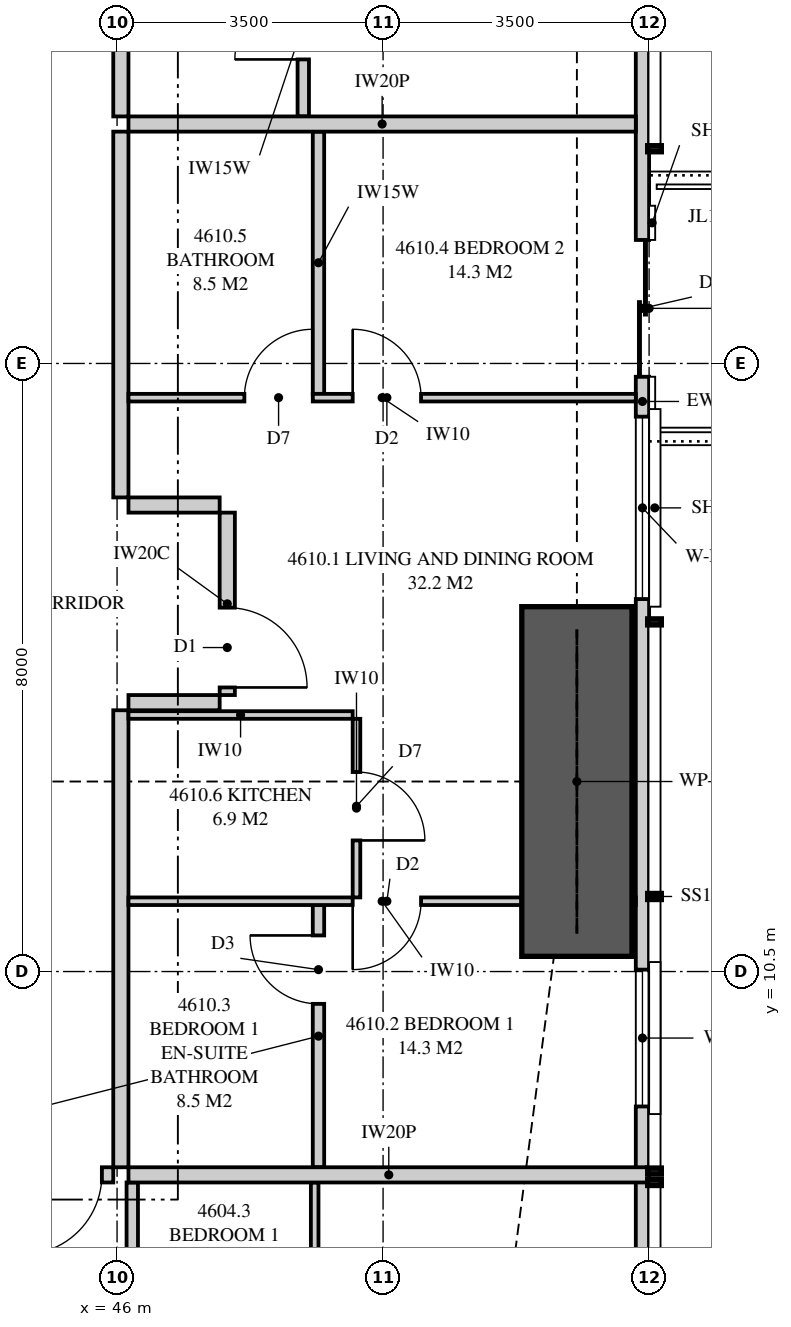
"""IFC4 building model, lengths in metres.
Left out: names, types, materials, properties, quantities, classifications, styles, units other than length and angle.
Written with IfcOpenShell. Run it as: python <this file> out.ifc"""

import sys

from ifc_helpers import new_model, si_unit, direction, frame, frame_2d, origin, place, context, subcontext, project, spatial, polyline, rectangle, outline, extrude, element, fill, save


model = new_model("IFC4")
c1 = context("Model", 3, precision=1e-05, world=origin(), true_north=direction((0.0, 1.0)))
c2 = subcontext(c1, "Body", "Model", "MODEL_VIEW")
j1 = project(units=[si_unit("LENGTHUNIT", "METRE"), si_unit("PLANEANGLEUNIT", "RADIAN")], contexts=[c1])
p1 = place(None, origin())
s1 = spatial("IfcSite", under=j1, at=p1, CompositionType="ELEMENT")
p2 = place(p1, origin())
s2 = spatial("IfcBuilding", under=s1, at=p2, CompositionType="ELEMENT")
p3 = place(p2, frame((0.0, 0.0, 171.1)))
s3 = spatial("IfcBuildingStorey", under=s2, at=p3, CompositionType="ELEMENT", Elevation=171.1)
p4 = place(p3, frame((52.913, 3.051, 0.0), z_axis=(0.0, 0.0, 1.0), x_axis=(0.0, 1.0, 0.0)))
e1 = element("IfcWall", 1, at=p4, inside=s3, PredefinedType="SOLIDWALL", context=c2, shape_type="SweptSolid", body=[
    extrude(outline(polyline([(0.0, 0.0), (29.897, 0.0), (29.897, 3.11), (22.167, 3.11), (22.167, 2.15), (22.074, 2.15), (22.074, 3.11), (21.949, 3.11), (21.949, 2.15), (9.949, 2.15), (9.949, 3.11), (9.847, 3.11), (9.847, 2.15), (9.706, 2.15), (9.706, 3.11), (0.0, 3.11), (0.0, 0.0)])), frame((0.0, 0.087, 0.0), z_axis=(0.0, -1.0, 0.0), x_axis=(1.0, 0.0, 0.0)), (0.0, 0.0, 1.0), 0.175),
])
p5 = place(p4, frame((1.797, 0.0, 0.4)))
e2 = element("IfcOpeningElement", 2, at=p5, cuts=e1, PredefinedType="OPENING", context=c2, shape_type="SweptSolid", body=[
    extrude(rectangle(XDim=1.8, YDim=1.7, at=frame_2d((0.9, 0.85))), frame((0.0, 0.097, 0.0), z_axis=(0.0, -1.0, 0.0), x_axis=(1.0, 0.0, 0.0)), (0.0, 0.0, 1.0), 0.195),
])
p6 = place(p4, frame((5.674, 0.0, 0.4)))
e3 = element("IfcOpeningElement", 3, at=p6, cuts=e1, PredefinedType="OPENING", context=c2, shape_type="SweptSolid", body=[
    extrude(rectangle(XDim=1.8, YDim=1.7, at=frame_2d((0.9, 0.85))), frame((0.0, 0.097, 0.0), z_axis=(0.0, -1.0, 0.0), x_axis=(1.0, 0.0, 0.0)), (0.0, 0.0, 1.0), 0.195),
])
p7 = place(p4, frame((12.349, 0.0, 0.4)))
e4 = element("IfcOpeningElement", 4, at=p7, cuts=e1, PredefinedType="OPENING", context=c2, shape_type="SweptSolid", body=[
    extrude(rectangle(XDim=2.4, YDim=1.7, at=frame_2d((1.2, 0.85))), frame((0.0, 0.097, 0.0), z_axis=(0.0, -1.0, 0.0), x_axis=(1.0, 0.0, 0.0)), (0.0, 0.0, 1.0), 0.195),
])
p8 = place(p4, frame((15.274, 0.0, 0.0)))
e5 = element("IfcOpeningElement", 5, at=p8, cuts=e1, PredefinedType="OPENING", context=c2, shape_type="SweptSolid", body=[
    extrude(rectangle(XDim=1.8, YDim=2.1, at=frame_2d((0.9, 1.05))), frame((0.0, 0.097, 0.0), z_axis=(0.0, -1.0, 0.0), x_axis=(1.0, 0.0, 0.0)), (0.0, 0.0, 1.0), 0.195),
])
p9 = place(p4, frame((24.373, 0.0, 0.4)))
e6 = element("IfcOpeningElement", 6, at=p9, cuts=e1, PredefinedType="OPENING", context=c2, shape_type="SweptSolid", body=[
    extrude(rectangle(XDim=1.2, YDim=1.7, at=frame_2d((0.6, 0.85))), frame((0.0, 0.097, 0.0), z_axis=(0.0, -1.0, 0.0), x_axis=(1.0, 0.0, 0.0)), (0.0, 0.0, 1.0), 0.195),
])
p10 = place(p4, frame((26.801, 0.0, 0.4)))
e7 = element("IfcOpeningElement", 7, at=p10, cuts=e1, PredefinedType="OPENING", context=c2, shape_type="SweptSolid", body=[
    extrude(rectangle(XDim=1.8, YDim=1.7, at=frame_2d((0.9, 0.85))), frame((0.0, 0.097, 0.0), z_axis=(0.0, -1.0, 0.0), x_axis=(1.0, 0.0, 0.0)), (0.0, 0.0, 1.0), 0.195),
])
p11 = place(p3, frame((42.05, 7.825, 0.0), z_axis=(0.0, 0.0, 1.0), x_axis=(1.0, 0.0, 0.0)))
e8 = element("IfcWall", 8, at=p11, inside=s3, PredefinedType="PARTITIONING", context=c2, shape_type="SweptSolid", body=[
    extrude(outline(polyline([(0.0, 0.0), (3.9, 0.0), (3.9, 3.11), (1.037, 3.11), (1.037, 2.541), (0.363, 2.541), (0.363, 3.11), (0.0, 3.11), (0.0, 0.0)])), frame((0.0, 0.1, 0.0), z_axis=(0.0, -1.0, 0.0), x_axis=(1.0, 0.0, 0.0)), (0.0, 0.0, 1.0), 0.2),
])
p12 = place(p11, frame((2.7, 0.0, 0.0)))
e9 = element("IfcOpeningElement", 9, at=p12, cuts=e8, PredefinedType="OPENING", context=c2, shape_type="SweptSolid", body=[
    extrude(rectangle(XDim=1.05, YDim=2.2, at=frame_2d((0.525, 1.1))), frame((0.0, 0.11, 0.0), z_axis=(0.0, -1.0, 0.0), x_axis=(1.0, 0.0, 0.0)), (0.0, 0.0, 1.0), 0.22),
])
p13 = place(p3, frame((48.6, 3.796, 0.0), z_axis=(0.0, 0.0, 1.0), x_axis=(0.0, 1.0, 0.0)))
e10 = element("IfcWall", 10, at=p13, inside=s3, PredefinedType="PARTITIONING", context=c2, shape_type="SweptSolid", body=[
    extrude(rectangle(XDim=3.929, YDim=0.1, at=frame_2d((1.964, 0.0))), origin(), (0.0, 0.0, 1.0), 3.11),
])
p14 = place(p13, frame((1.477, 0.0, 0.0)))
e11 = element("IfcOpeningElement", 11, at=p14, cuts=e10, PredefinedType="OPENING", context=c2, shape_type="SweptSolid", body=[
    extrude(rectangle(XDim=0.9, YDim=2.1, at=frame_2d((0.45, 1.05))), frame((0.0, 0.06, 0.0), z_axis=(0.0, -1.0, 0.0), x_axis=(1.0, 0.0, 0.0)), (0.0, 0.0, 1.0), 0.12),
])
p15 = place(p3, frame((46.2, 3.796, 0.0), z_axis=(0.0, 0.0, 1.0), x_axis=(0.0, 1.0, 0.0)))
e12 = element("IfcWall", 12, at=p15, inside=s3, PredefinedType="PLUMBINGWALL", context=c2, shape_type="SweptSolid", body=[
    extrude(rectangle(XDim=3.929, YDim=0.15, at=frame_2d((1.964, 0.0))), origin(), (0.0, 0.0, 1.0), 3.11),
])
p16 = place(p3, frame((46.15, 7.825, 0.0), z_axis=(0.0, 0.0, 1.0), x_axis=(1.0, 0.0, 0.0)))
e13 = element("IfcWall", 13, at=p16, inside=s3, PredefinedType="PARTITIONING", context=c2, shape_type="SweptSolid", body=[
    extrude(outline(polyline([(0.0, 0.0), (6.85, 0.0), (6.85, 3.11), (6.138, 3.11), (6.138, 2.15), (4.303, 2.15), (4.303, 3.11), (0.0, 3.11), (0.0, 0.0)])), frame((0.0, 0.1, 0.0), z_axis=(0.0, -1.0, 0.0), x_axis=(1.0, 0.0, 0.0)), (0.0, 0.0, 1.0), 0.2),
])
p17 = place(p3, frame((52.825, 21.65, 0.0), z_axis=(0.0, 0.0, 1.0), x_axis=(-1.0, 0.0, 0.0)))
e14 = element("IfcWall", 14, at=p17, inside=s3, PredefinedType="PARTITIONING", context=c2, shape_type="SweptSolid", body=[
    extrude(outline(polyline([(0.0, 0.0), (6.675, 0.0), (6.675, 3.11), (1.685, 3.11), (1.685, 2.15), (0.0, 2.15), (0.0, 3.11), (0.0, 0.0)])), frame((0.0, 0.1, 0.0), z_axis=(0.0, -1.0, 0.0), x_axis=(1.0, 0.0, 0.0)), (0.0, 0.0, 1.0), 0.2),
])
p18 = place(p3, frame((46.05, 7.925, 0.0), z_axis=(0.0, 0.0, 1.0), x_axis=(0.0, 1.0, 0.0)))
e15 = element("IfcWall", 15, at=p18, inside=s3, PredefinedType="PARTITIONING", context=c2, shape_type="SweptSolid", body=[
    extrude(outline(polyline([(0.0, 0.0), (6.012, 0.0), (6.012, 3.11), (5.412, 3.11), (5.412, 2.541), (4.738, 2.541), (4.738, 3.11), (0.0, 3.11), (0.0, 0.0)])), frame((0.0, 0.1, 0.0), z_axis=(0.0, -1.0, 0.0), x_axis=(1.0, 0.0, 0.0)), (0.0, 0.0, 1.0), 0.2),
])
p19 = place(p3, frame((52.825, 11.425, 0.0), z_axis=(0.0, 0.0, 1.0), x_axis=(-1.0, 0.0, 0.0)))
e16 = element("IfcWall", 16, at=p19, inside=s3, PredefinedType="PARTITIONING", context=c2, shape_type="SweptSolid", body=[
    extrude(outline(polyline([(0.115, 3.11), (0.0, 3.11), (0.0, 0.0), (0.529, 0.0), (0.529, 0.185), (1.021, 0.185), (1.021, 0.0), (6.675, 0.0), (6.675, 3.11), (1.849, 3.11), (1.849, 2.15), (1.021, 2.15), (1.021, 1.964), (0.529, 1.964), (0.529, 2.15), (0.115, 2.15), (0.115, 3.11)])), frame((0.0, 0.05, 0.0), z_axis=(0.0, -1.0, 0.0), x_axis=(1.0, 0.0, 0.0)), (0.0, 0.0, 1.0), 0.1),
])
p20 = place(p19, frame((2.825, 0.0, 0.0)))
e17 = element("IfcOpeningElement", 17, at=p20, cuts=e16, PredefinedType="OPENING", context=c2, shape_type="SweptSolid", body=[
    extrude(rectangle(XDim=0.9, YDim=2.1, at=frame_2d((0.45, 1.05))), frame((0.0, 0.06, 0.0), z_axis=(0.0, -1.0, 0.0), x_axis=(1.0, 0.0, 0.0)), (0.0, 0.0, 1.0), 0.12),
])
p21 = place(p3, frame((52.825, 18.05, 0.0), z_axis=(0.0, 0.0, 1.0), x_axis=(-1.0, 0.0, 0.0)))
e18 = element("IfcWall", 18, at=p21, inside=s3, PredefinedType="PARTITIONING", context=c2, shape_type="SweptSolid", body=[
    extrude(outline(polyline([(0.0, 0.0), (6.675, 0.0), (6.675, 3.11), (1.635, 3.11), (1.635, 2.15), (0.0, 2.15), (0.0, 3.11), (0.0, 0.0)])), frame((0.0, 0.05, 0.0), z_axis=(0.0, -1.0, 0.0), x_axis=(1.0, 0.0, 0.0)), (0.0, 0.0, 1.0), 0.1),
])
p22 = place(p21, frame((2.825, 0.0, 0.0)))
e19 = element("IfcOpeningElement", 19, at=p22, cuts=e18, PredefinedType="OPENING", context=c2, shape_type="SweptSolid", body=[
    extrude(rectangle(XDim=0.9, YDim=2.1, at=frame_2d((0.45, 1.05))), frame((0.0, 0.06, 0.0), z_axis=(0.0, -1.0, 0.0), x_axis=(1.0, 0.0, 0.0)), (0.0, 0.0, 1.0), 0.12),
])
p23 = place(p21, frame((4.25, 0.0, 0.0)))
e20 = element("IfcOpeningElement", 20, at=p23, cuts=e18, PredefinedType="OPENING", context=c2, shape_type="SweptSolid", body=[
    extrude(rectangle(XDim=0.9, YDim=2.1, at=frame_2d((0.45, 1.05))), frame((0.0, 0.06, 0.0), z_axis=(0.0, -1.0, 0.0), x_axis=(1.0, 0.0, 0.0)), (0.0, 0.0, 1.0), 0.12),
])
p24 = place(p3, frame((48.65, 7.925, 0.0), z_axis=(0.0, 0.0, 1.0), x_axis=(0.0, 1.0, 0.0)))
e21 = element("IfcWall", 21, at=p24, inside=s3, PredefinedType="PLUMBINGWALL", context=c2, shape_type="SweptSolid", body=[
    extrude(rectangle(XDim=3.45, YDim=0.15, at=frame_2d((1.725, 0.0))), origin(), (0.0, 0.0, 1.0), 3.11),
])
p25 = place(p24, frame((2.15, 0.0, 0.0)))
e22 = element("IfcOpeningElement", 22, at=p25, cuts=e21, PredefinedType="OPENING", context=c2, shape_type="SweptSolid", body=[
    extrude(rectangle(XDim=0.9, YDim=2.1, at=frame_2d((0.45, 1.05))), frame((0.0, 0.085, 0.0), z_axis=(0.0, -1.0, 0.0), x_axis=(1.0, 0.0, 0.0)), (0.0, 0.0, 1.0), 0.17),
])
p26 = place(p3, frame((48.65, 18.1, 0.0), z_axis=(0.0, 0.0, 1.0), x_axis=(0.0, 1.0, 0.0)))
e23 = element("IfcWall", 23, at=p26, inside=s3, PredefinedType="PLUMBINGWALL", context=c2, shape_type="SweptSolid", body=[
    extrude(rectangle(XDim=3.45, YDim=0.15, at=frame_2d((1.725, 0.0))), origin(), (0.0, 0.0, 1.0), 3.11),
])
p27 = place(p3, frame((49.15, 11.475, 0.0), z_axis=(0.0, 0.0, 1.0), x_axis=(0.0, 1.0, 0.0)))
e24 = element("IfcWall", 24, at=p27, inside=s3, PredefinedType="PARTITIONING", context=c2, shape_type="SweptSolid", body=[
    extrude(outline(polyline([(0.0, 0.0), (2.35, 0.0), (2.35, 3.11), (1.812, 3.11), (1.812, 2.541), (1.238, 2.541), (1.238, 3.11), (0.0, 3.11), (0.0, 0.0)])), frame((0.0, 0.05, 0.0), z_axis=(0.0, -1.0, 0.0), x_axis=(1.0, 0.0, 0.0)), (0.0, 0.0, 1.0), 0.1),
])
p28 = place(p27, frame((0.75, 0.0, 0.0)))
e25 = element("IfcOpeningElement", 25, at=p28, cuts=e24, PredefinedType="OPENING", context=c2, shape_type="SweptSolid", body=[
    extrude(rectangle(XDim=0.9, YDim=2.1, at=frame_2d((0.45, 1.05))), frame((0.0, 0.06, 0.0), z_axis=(0.0, -1.0, 0.0), x_axis=(1.0, 0.0, 0.0)), (0.0, 0.0, 1.0), 0.12),
])
p29 = place(p3, frame((49.1, 13.875, 0.0), z_axis=(0.0, 0.0, 1.0), x_axis=(-1.0, 0.0, 0.0)))
e26 = element("IfcWall", 26, at=p29, inside=s3, PredefinedType="PARTITIONING", context=c2, shape_type="SweptSolid", body=[
    extrude(rectangle(XDim=2.95, YDim=0.1, at=frame_2d((1.475, 0.0))), origin(), (0.0, 0.0, 1.0), 3.11),
])
p30 = place(p3, frame((46.05, 21.75, 0.0), z_axis=(0.0, 0.0, 1.0), x_axis=(0.0, 1.0, 0.0)))
e27 = element("IfcWall", 27, at=p30, inside=s3, PredefinedType="PARTITIONING", context=c2, shape_type="SweptSolid", body=[
    extrude(outline(polyline([(0.0, 0.0), (7.325, 0.0), (7.325, 3.11), (3.587, 3.11), (3.587, 2.541), (2.913, 2.541), (2.913, 3.11), (0.0, 3.11), (0.0, 0.0)])), frame((0.0, 0.1, 0.0), z_axis=(0.0, -1.0, 0.0), x_axis=(1.0, 0.0, 0.0)), (0.0, 0.0, 1.0), 0.2),
])
p31 = place(p30, frame((3.163, 0.0, 0.0)))
e28 = element("IfcOpeningElement", 28, at=p31, cuts=e27, PredefinedType="OPENING", context=c2, shape_type="SweptSolid", body=[
    extrude(rectangle(XDim=1.05, YDim=2.2, at=frame_2d((0.525, 1.1))), frame((0.0, 0.11, 0.0), z_axis=(0.0, -1.0, 0.0), x_axis=(1.0, 0.0, 0.0)), (0.0, 0.0, 1.0), 0.22),
])
p32 = place(p3, frame((48.45, 21.75, 0.0), z_axis=(0.0, 0.0, 1.0), x_axis=(0.0, 1.0, 0.0)))
e29 = element("IfcWall", 29, at=p32, inside=s3, PredefinedType="PLUMBINGWALL", context=c2, shape_type="SweptSolid", body=[
    extrude(rectangle(XDim=2.425, YDim=0.15, at=frame_2d((1.212, 0.0))), origin(), (0.0, 0.0, 1.0), 3.11),
])
p33 = place(p32, frame((0.75, 0.0, 0.0)))
e30 = element("IfcOpeningElement", 30, at=p33, cuts=e29, PredefinedType="OPENING", context=c2, shape_type="SweptSolid", body=[
    extrude(rectangle(XDim=0.9, YDim=2.1, at=frame_2d((0.45, 1.05))), frame((0.0, 0.085, 0.0), z_axis=(0.0, -1.0, 0.0), x_axis=(1.0, 0.0, 0.0)), (0.0, 0.0, 1.0), 0.17),
])
p34 = place(p3, frame((46.05, 16.738, 0.0), z_axis=(0.0, 0.0, 1.0), x_axis=(0.0, 1.0, 0.0)))
e31 = element("IfcWall", 31, at=p34, inside=s3, PredefinedType="PARTITIONING", context=c2, shape_type="SweptSolid", body=[
    extrude(rectangle(XDim=4.812, YDim=0.2, at=frame_2d((2.406, 0.0))), origin(), (0.0, 0.0, 1.0), 3.11),
])
p35 = place(p3, frame((47.45, 14.137, 0.0), z_axis=(0.0, 0.0, 1.0), x_axis=(0.0, 1.0, 0.0)))
e32 = element("IfcWall", 32, at=p35, inside=s3, PredefinedType="PARTITIONING", context=c2, shape_type="SweptSolid", body=[
    extrude(rectangle(XDim=2.4, YDim=0.2, at=frame_2d((1.2, 0.0))), origin(), (0.0, 0.0, 1.0), 3.11),
])
p36 = place(p35, frame((0.1, 0.0, 0.0)))
e33 = element("IfcOpeningElement", 33, at=p36, cuts=e32, PredefinedType="OPENING", context=c2, shape_type="SweptSolid", body=[
    extrude(rectangle(XDim=1.05, YDim=2.2, at=frame_2d((0.525, 1.1))), frame((0.0, 0.11, 0.0), z_axis=(0.0, -1.0, 0.0), x_axis=(1.0, 0.0, 0.0)), (0.0, 0.0, 1.0), 0.22),
])
for number, where, z_axis, x_axis in (
    (34, (46.15, 14.038, 0.0), (0.0, 0.0, 1.0), (1.0, 0.0, 0.0)),
    (35, (46.15, 16.637, 0.0), (0.0, 0.0, 1.0), (1.0, 0.0, 0.0)),
):
    element("IfcWall", number, at=place(p3, frame(where, z_axis=z_axis, x_axis=x_axis)), inside=s3, PredefinedType="PARTITIONING", context=c2, shape_type="SweptSolid", body=[
        extrude(rectangle(XDim=1.2, YDim=0.2, at=frame_2d((0.6, 0.0))), origin(), (0.0, 0.0, 1.0), 3.11),
    ])
p37 = place(p3, frame((52.05, 10.7, 0.0), z_axis=(0.0, 0.0, 1.0), x_axis=(0.0, 1.0, 0.0)))
e36 = element("IfcWall", 36, at=p37, inside=s3, PredefinedType="SHEAR", context=c2, shape_type="SweptSolid", body=[
    extrude(rectangle(XDim=4.6, YDim=1.45, at=frame_2d((2.3, 0.0))), origin(), (0.0, 0.0, 1.0), 3.35),
])
p38 = place(p6, origin())
e37 = element("IfcWindow", 37, at=p38, inside=s3, PartitioningType="SINGLE_PANEL", PredefinedType="WINDOW", context=c2, shape_type="SweptSolid", body=[
    extrude(rectangle(XDim=1.8, YDim=1.7, at=frame_2d((0.9, 0.85))), frame((0.0, 0.03, 0.0), z_axis=(0.0, -1.0, 0.0), x_axis=(1.0, 0.0, 0.0)), (0.0, 0.0, 1.0), 0.06),
])
fill(e3, e37)
p39 = place(p7, origin())
e38 = element("IfcWindow", 38, at=p39, inside=s3, PartitioningType="SINGLE_PANEL", PredefinedType="WINDOW", context=c2, shape_type="SweptSolid", body=[
    extrude(rectangle(XDim=2.4, YDim=1.7, at=frame_2d((1.2, 0.85))), frame((0.0, 0.03, 0.0), z_axis=(0.0, -1.0, 0.0), x_axis=(1.0, 0.0, 0.0)), (0.0, 0.0, 1.0), 0.06),
])
fill(e4, e38)
p40 = place(p8, origin())
e39 = element("IfcDoor", 39, at=p40, inside=s3, OperationType="SLIDING_TO_LEFT", PredefinedType="DOOR", context=c2, shape_type="SweptSolid", body=[
    extrude(rectangle(XDim=1.8, YDim=2.1, at=frame_2d((0.9, 1.05))), frame((0.0, 0.025, 0.0), z_axis=(0.0, -1.0, 0.0), x_axis=(1.0, 0.0, 0.0)), (0.0, 0.0, 1.0), 0.05),
])
fill(e5, e39)
p41 = place(p12, frame((1.05, 0.0, 0.0), z_axis=(0.0, 0.0, 1.0), x_axis=(-1.0, 0.0, 0.0)))
e40 = element("IfcDoor", 40, at=p41, inside=s3, OperationType="SINGLE_SWING_RIGHT", PredefinedType="DOOR", context=c2, shape_type="SweptSolid", body=[
    extrude(rectangle(XDim=1.05, YDim=2.2, at=frame_2d((0.525, 1.1))), frame((0.0, 0.025, 0.0), z_axis=(0.0, -1.0, 0.0), x_axis=(1.0, 0.0, 0.0)), (0.0, 0.0, 1.0), 0.05),
])
fill(e9, e40)
p42 = place(p36, frame((1.05, 0.0, 0.0), z_axis=(0.0, 0.0, 1.0), x_axis=(-1.0, 0.0, 0.0)))
e41 = element("IfcDoor", 41, at=p42, inside=s3, OperationType="SINGLE_SWING_RIGHT", PredefinedType="DOOR", context=c2, shape_type="SweptSolid", body=[
    extrude(rectangle(XDim=1.05, YDim=2.2, at=frame_2d((0.525, 1.1))), frame((0.0, 0.025, 0.0), z_axis=(0.0, -1.0, 0.0), x_axis=(1.0, 0.0, 0.0)), (0.0, 0.0, 1.0), 0.05),
])
fill(e33, e41)
p43 = place(p20, origin())
e42 = element("IfcDoor", 42, at=p43, inside=s3, OperationType="SINGLE_SWING_RIGHT", PredefinedType="DOOR", context=c2, shape_type="SweptSolid", body=[
    extrude(rectangle(XDim=0.9, YDim=2.1, at=frame_2d((0.45, 1.05))), frame((0.0, 0.025, 0.0), z_axis=(0.0, -1.0, 0.0), x_axis=(1.0, 0.0, 0.0)), (0.0, 0.0, 1.0), 0.05),
])
fill(e17, e42)
p44 = place(p25, origin())
e43 = element("IfcDoor", 43, at=p44, inside=s3, OperationType="SINGLE_SWING_RIGHT", PredefinedType="DOOR", context=c2, shape_type="SweptSolid", body=[
    extrude(rectangle(XDim=0.9, YDim=2.1, at=frame_2d((0.45, 1.05))), frame((0.0, 0.025, 0.0), z_axis=(0.0, -1.0, 0.0), x_axis=(1.0, 0.0, 0.0)), (0.0, 0.0, 1.0), 0.05),
])
fill(e22, e43)
p45 = place(p22, frame((0.9, 0.0, 0.0), z_axis=(0.0, 0.0, 1.0), x_axis=(-1.0, 0.0, 0.0)))
e44 = element("IfcDoor", 44, at=p45, inside=s3, OperationType="SINGLE_SWING_LEFT", PredefinedType="DOOR", context=c2, shape_type="SweptSolid", body=[
    extrude(rectangle(XDim=0.9, YDim=2.1, at=frame_2d((0.45, 1.05))), frame((0.0, 0.025, 0.0), z_axis=(0.0, -1.0, 0.0), x_axis=(1.0, 0.0, 0.0)), (0.0, 0.0, 1.0), 0.05),
])
fill(e19, e44)
p46 = place(p23, frame((0.9, 0.0, 0.0), z_axis=(0.0, 0.0, 1.0), x_axis=(-1.0, 0.0, 0.0)))
e45 = element("IfcDoor", 45, at=p46, inside=s3, OperationType="SINGLE_SWING_RIGHT", PredefinedType="DOOR", context=c2, shape_type="SweptSolid", body=[
    extrude(rectangle(XDim=0.9, YDim=2.1, at=frame_2d((0.45, 1.05))), frame((0.0, 0.025, 0.0), z_axis=(0.0, -1.0, 0.0), x_axis=(1.0, 0.0, 0.0)), (0.0, 0.0, 1.0), 0.05),
])
fill(e20, e45)
p47 = place(p28, frame((0.9, 0.0, 0.0), z_axis=(0.0, 0.0, 1.0), x_axis=(-1.0, 0.0, 0.0)))
e46 = element("IfcDoor", 46, at=p47, inside=s3, OperationType="SINGLE_SWING_RIGHT", PredefinedType="DOOR", context=c2, shape_type="SweptSolid", body=[
    extrude(rectangle(XDim=0.9, YDim=2.1, at=frame_2d((0.45, 1.05))), frame((0.0, 0.025, 0.0), z_axis=(0.0, -1.0, 0.0), x_axis=(1.0, 0.0, 0.0)), (0.0, 0.0, 1.0), 0.05),
])
fill(e25, e46)
p48 = place(p33, origin())
e47 = element("IfcDoor", 47, at=p48, inside=s3, OperationType="SINGLE_SWING_LEFT", PredefinedType="DOOR", context=c2, shape_type="SweptSolid", body=[
    extrude(rectangle(XDim=0.9, YDim=2.1, at=frame_2d((0.45, 1.05))), frame((0.0, 0.025, 0.0), z_axis=(0.0, -1.0, 0.0), x_axis=(1.0, 0.0, 0.0)), (0.0, 0.0, 1.0), 0.05),
])
fill(e30, e47)
save(model, sys.argv[1])
